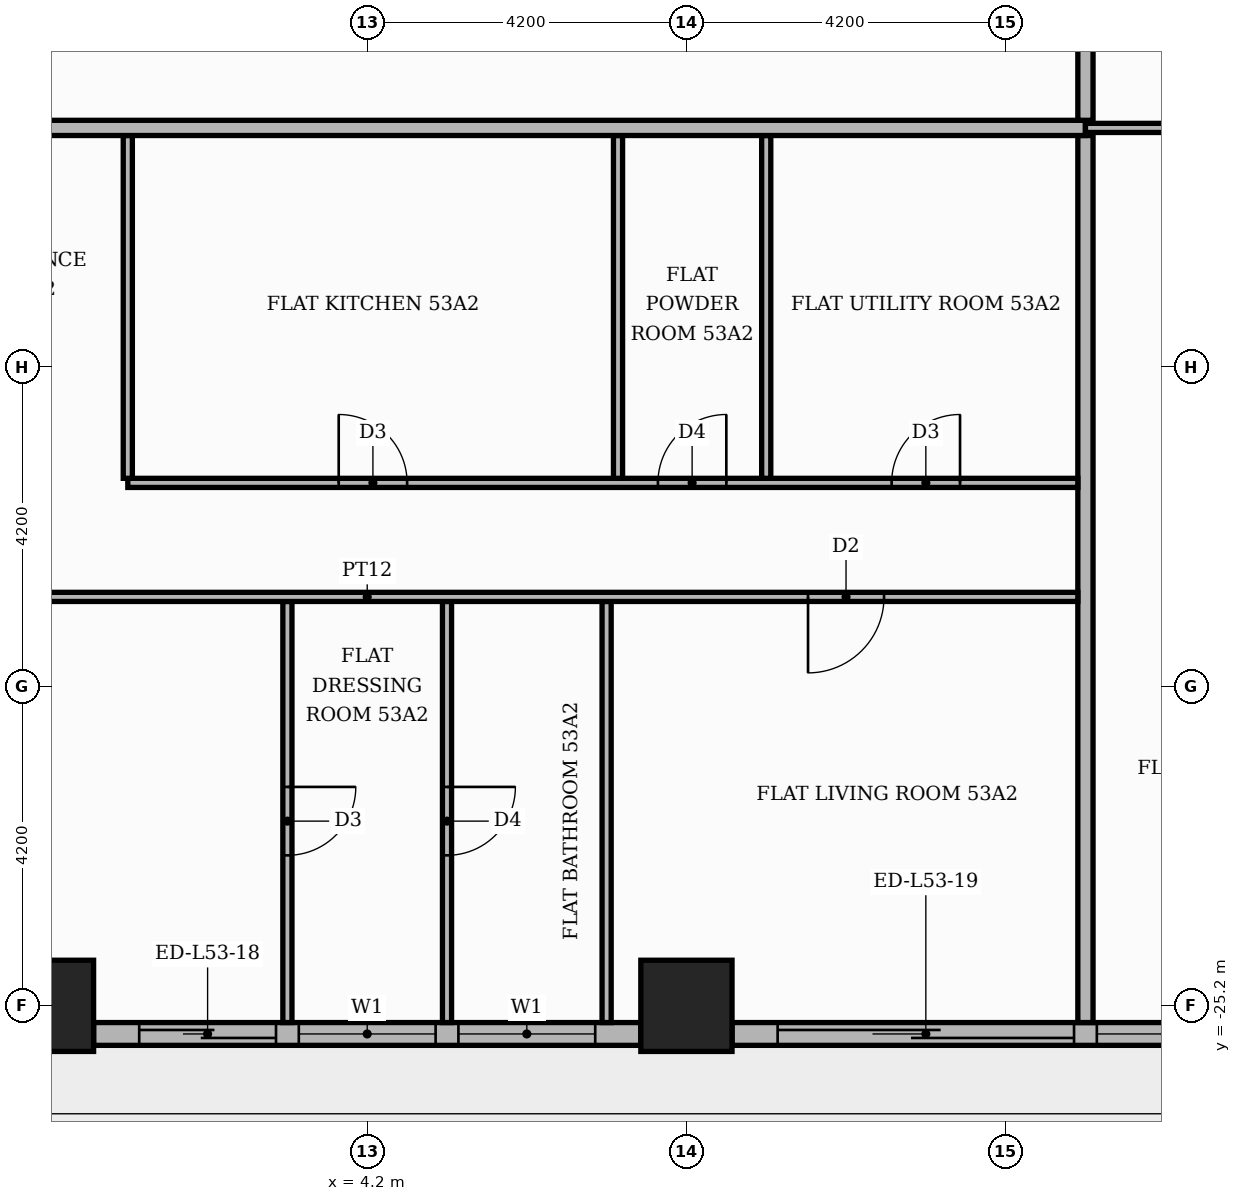
"""IFC4 building model, lengths in metres.
Left out: names, types, materials, properties, quantities, classifications, styles, units other than length and angle.
Written with IfcOpenShell. Run it as: python <this file> out.ifc"""

import sys

from ifc_helpers import new_model, si_unit, direction, frame, frame_2d, origin, origin_2d, place, context, subcontext, project, spatial, rectangle, extrude, element, fill, save


model = new_model("IFC4")
c1 = context("Model", 3, precision=1e-05, world=origin(), true_north=direction((0.0, 1.0)))
c2 = subcontext(c1, "Body", "Model", "MODEL_VIEW")
j1 = project(units=[si_unit("LENGTHUNIT", "METRE"), si_unit("PLANEANGLEUNIT", "RADIAN")], contexts=[c1])
p1 = place(None, origin())
s1 = spatial("IfcSite", under=j1, at=p1, CompositionType="ELEMENT")
p2 = place(p1, origin())
s2 = spatial("IfcBuilding", under=s1, at=p2, CompositionType="ELEMENT")
p3 = place(p2, frame((0.0, 0.0, 223.5)))
s3 = spatial("IfcBuildingStorey", under=s2, at=p3, CompositionType="ELEMENT", Elevation=223.5)
for number, where, z_axis, x_axis in (
    (1, (0.0, -25.2, 0.0), (0.0, 0.0, 1.0), (1.0, 0.0, 0.0)),
    (2, (8.4, -25.2, 0.0), (0.0, 0.0, 1.0), (1.0, 0.0, 0.0)),
):
    element("IfcColumn", number, at=place(p3, frame(where, z_axis=z_axis, x_axis=x_axis)), inside=s3, PredefinedType="COLUMN", context=c2, shape_type="SweptSolid", body=[
        extrude(rectangle(XDim=1.2, YDim=1.2, at=origin_2d()), origin(), (0.0, 0.0, 1.0), 3.9),
    ])
p4 = place(p3, frame((0.6, -25.57, 0.0), z_axis=(0.0, 0.0, 1.0), x_axis=(1.0, 0.0, 0.0)))
e3 = element("IfcWall", 3, at=p4, inside=s3, PredefinedType="STANDARD", context=c2, shape_type="SweptSolid", body=[
    extrude(rectangle(XDim=7.2, YDim=0.3, at=frame_2d((3.6, 0.0))), origin(), (0.0, 0.0, 1.0), 3.48),
])
p5 = place(p4, frame((0.6, 0.0, 0.0)))
e4 = element("IfcOpeningElement", 4, at=p5, cuts=e3, PredefinedType="OPENING", context=c2, shape_type="SweptSolid", body=[
    extrude(rectangle(XDim=1.8, YDim=2.4, at=frame_2d((0.9, 1.2))), frame((0.0, 0.16, 0.0), z_axis=(0.0, -1.0, 0.0), x_axis=(1.0, 0.0, 0.0)), (0.0, 0.0, 1.0), 0.32),
])
p6 = place(p4, frame((2.7, 0.0, 0.9)))
e5 = element("IfcOpeningElement", 5, at=p6, cuts=e3, PredefinedType="OPENING", context=c2, shape_type="SweptSolid", body=[
    extrude(rectangle(XDim=1.8, YDim=2.1, at=frame_2d((0.9, 1.05))), frame((0.0, 0.16, 0.0), z_axis=(0.0, -1.0, 0.0), x_axis=(1.0, 0.0, 0.0)), (0.0, 0.0, 1.0), 0.32),
])
p7 = place(p4, frame((4.8, 0.0, 0.9)))
e6 = element("IfcOpeningElement", 6, at=p7, cuts=e3, PredefinedType="OPENING", context=c2, shape_type="SweptSolid", body=[
    extrude(rectangle(XDim=1.8, YDim=2.1, at=frame_2d((0.9, 1.05))), frame((0.0, 0.16, 0.0), z_axis=(0.0, -1.0, 0.0), x_axis=(1.0, 0.0, 0.0)), (0.0, 0.0, 1.0), 0.32),
])
p8 = place(p3, frame((9.0, -25.57, 0.0), z_axis=(0.0, 0.0, 1.0), x_axis=(1.0, 0.0, 0.0)))
e7 = element("IfcWall", 7, at=p8, inside=s3, PredefinedType="STANDARD", context=c2, shape_type="SweptSolid", body=[
    extrude(rectangle(XDim=7.2, YDim=0.3, at=frame_2d((3.6, 0.0))), origin(), (0.0, 0.0, 1.0), 3.48),
])
p9 = place(p8, frame((0.6, 0.0, 0.0)))
e8 = element("IfcOpeningElement", 8, at=p9, cuts=e7, PredefinedType="OPENING", context=c2, shape_type="SweptSolid", body=[
    extrude(rectangle(XDim=3.9, YDim=2.4, at=frame_2d((1.95, 1.2))), frame((0.0, 0.16, 0.0), z_axis=(0.0, -1.0, 0.0), x_axis=(1.0, 0.0, 0.0)), (0.0, 0.0, 1.0), 0.32),
])
p10 = place(p8, frame((4.8, 0.0, 0.9)))
e9 = element("IfcOpeningElement", 9, at=p10, cuts=e7, PredefinedType="OPENING", context=c2, shape_type="SweptSolid", body=[
    extrude(rectangle(XDim=1.8, YDim=2.1, at=frame_2d((0.9, 1.05))), frame((0.0, 0.16, 0.0), z_axis=(0.0, -1.0, 0.0), x_axis=(1.0, 0.0, 0.0)), (0.0, 0.0, 1.0), 0.32),
])
p11 = place(p3, frame((3.15, -25.42, 0.0), z_axis=(0.0, 0.0, 1.0), x_axis=(0.0, 1.0, 0.0)))
e10 = element("IfcWall", 10, at=p11, inside=s3, PredefinedType="PARTITIONING", context=c2, shape_type="SweptSolid", body=[
    extrude(rectangle(XDim=5.54, YDim=0.12, at=frame_2d((2.77, 0.0))), origin(), (0.0, 0.0, 1.0), 3.48),
])
p12 = place(p11, frame((2.2, 0.0, 0.0)))
e11 = element("IfcOpeningElement", 11, at=p12, cuts=e10, PredefinedType="OPENING", context=c2, shape_type="SweptSolid", body=[
    extrude(rectangle(XDim=0.9, YDim=2.1, at=frame_2d((0.45, 1.05))), frame((0.0, 0.07, 0.0), z_axis=(0.0, -1.0, 0.0), x_axis=(1.0, 0.0, 0.0)), (0.0, 0.0, 1.0), 0.14),
])
p13 = place(p3, frame((5.25, -25.42, 0.0), z_axis=(0.0, 0.0, 1.0), x_axis=(0.0, 1.0, 0.0)))
e12 = element("IfcWall", 12, at=p13, inside=s3, PredefinedType="PARTITIONING", context=c2, shape_type="SweptSolid", body=[
    extrude(rectangle(XDim=5.54, YDim=0.12, at=frame_2d((2.77, 0.0))), origin(), (0.0, 0.0, 1.0), 3.48),
])
p14 = place(p13, frame((2.2, 0.0, 0.0)))
e13 = element("IfcOpeningElement", 13, at=p14, cuts=e12, PredefinedType="OPENING", context=c2, shape_type="SweptSolid", body=[
    extrude(rectangle(XDim=0.9, YDim=2.1, at=frame_2d((0.45, 1.05))), frame((0.0, 0.07, 0.0), z_axis=(0.0, -1.0, 0.0), x_axis=(1.0, 0.0, 0.0)), (0.0, 0.0, 1.0), 0.14),
])
p15 = place(p3, frame((7.35, -25.42, 0.0), z_axis=(0.0, 0.0, 1.0), x_axis=(0.0, 1.0, 0.0)))
e14 = element("IfcWall", 14, at=p15, inside=s3, PredefinedType="PARTITIONING", context=c2, shape_type="SweptSolid", body=[
    extrude(rectangle(XDim=5.54, YDim=0.12, at=frame_2d((2.77, 0.0))), origin(), (0.0, 0.0, 1.0), 3.48),
])
p16 = place(p3, frame((13.65, -25.42, 0.0), z_axis=(0.0, 0.0, 1.0), x_axis=(0.0, 1.0, 0.0)))
e15 = element("IfcWall", 15, at=p16, inside=s3, PredefinedType="PARTITIONING", context=c2, shape_type="SweptSolid", body=[
    extrude(rectangle(XDim=11.67, YDim=0.2, at=frame_2d((5.835, 0.0))), origin(), (0.0, 0.0, 1.0), 3.48),
])
p17 = place(p3, frame((-5.15, -19.82, 0.0), z_axis=(0.0, 0.0, 1.0), x_axis=(1.0, 0.0, 0.0)))
e16 = element("IfcWall", 16, at=p17, inside=s3, PredefinedType="PARTITIONING", context=c2, shape_type="SweptSolid", body=[
    extrude(rectangle(XDim=18.7, YDim=0.12, at=frame_2d((9.35, 0.0))), origin(), (0.0, 0.0, 1.0), 3.48),
])
p18 = place(p17, frame((3.65, 0.0, 0.0)))
e17 = element("IfcOpeningElement", 17, at=p18, cuts=e16, PredefinedType="OPENING", context=c2, shape_type="SweptSolid", body=[
    extrude(rectangle(XDim=0.9, YDim=2.1, at=frame_2d((0.45, 1.05))), frame((0.0, 0.07, 0.0), z_axis=(0.0, -1.0, 0.0), x_axis=(1.0, 0.0, 0.0)), (0.0, 0.0, 1.0), 0.14),
])
p19 = place(p17, frame((15.15, 0.0, 0.0)))
e18 = element("IfcOpeningElement", 18, at=p19, cuts=e16, PredefinedType="OPENING", context=c2, shape_type="SweptSolid", body=[
    extrude(rectangle(XDim=1.0, YDim=2.1, at=frame_2d((0.5, 1.05))), frame((0.0, 0.07, 0.0), z_axis=(0.0, -1.0, 0.0), x_axis=(1.0, 0.0, 0.0)), (0.0, 0.0, 1.0), 0.14),
])
p20 = place(p3, frame((1.05, -18.32, 0.0), z_axis=(0.0, 0.0, 1.0), x_axis=(1.0, 0.0, 0.0)))
e19 = element("IfcWall", 19, at=p20, inside=s3, PredefinedType="PARTITIONING", context=c2, shape_type="SweptSolid", body=[
    extrude(rectangle(XDim=12.5, YDim=0.12, at=frame_2d((6.25, 0.0))), origin(), (0.0, 0.0, 1.0), 3.48),
])
p21 = place(p20, frame((2.775, 0.0, 0.0)))
e20 = element("IfcOpeningElement", 20, at=p21, cuts=e19, PredefinedType="OPENING", context=c2, shape_type="SweptSolid", body=[
    extrude(rectangle(XDim=0.9, YDim=2.1, at=frame_2d((0.45, 1.05))), frame((0.0, 0.07, 0.0), z_axis=(0.0, -1.0, 0.0), x_axis=(1.0, 0.0, 0.0)), (0.0, 0.0, 1.0), 0.14),
])
p22 = place(p20, frame((6.975, 0.0, 0.0)))
e21 = element("IfcOpeningElement", 21, at=p22, cuts=e19, PredefinedType="OPENING", context=c2, shape_type="SweptSolid", body=[
    extrude(rectangle(XDim=0.9, YDim=2.1, at=frame_2d((0.45, 1.05))), frame((0.0, 0.07, 0.0), z_axis=(0.0, -1.0, 0.0), x_axis=(1.0, 0.0, 0.0)), (0.0, 0.0, 1.0), 0.14),
])
p23 = place(p20, frame((10.05, 0.0, 0.0)))
e22 = element("IfcOpeningElement", 22, at=p23, cuts=e19, PredefinedType="OPENING", context=c2, shape_type="SweptSolid", body=[
    extrude(rectangle(XDim=0.9, YDim=2.1, at=frame_2d((0.45, 1.05))), frame((0.0, 0.07, 0.0), z_axis=(0.0, -1.0, 0.0), x_axis=(1.0, 0.0, 0.0)), (0.0, 0.0, 1.0), 0.14),
])
for number, where, z_axis, x_axis in (
    (23, (1.05, -18.26, 0.0), (0.0, 0.0, 1.0), (0.0, 1.0, 0.0)),
    (24, (7.5, -18.26, 0.0), (0.0, 0.0, 1.0), (0.0, 1.0, 0.0)),
    (25, (9.45, -18.26, 0.0), (0.0, 0.0, 1.0), (0.0, 1.0, 0.0)),
):
    element("IfcWall", number, at=place(p3, frame(where, z_axis=z_axis, x_axis=x_axis)), inside=s3, PredefinedType="PARTITIONING", context=c2, shape_type="SweptSolid", body=[
        extrude(rectangle(XDim=4.51, YDim=0.12, at=frame_2d((2.255, 0.0))), origin(), (0.0, 0.0, 1.0), 3.48),
    ])
p24 = place(p3, frame((-25.42, -13.65, 0.0), z_axis=(0.0, 0.0, 1.0), x_axis=(1.0, 0.0, 0.0)))
e26 = element("IfcWall", 26, at=p24, inside=s3, PredefinedType="PARTITIONING", context=c2, shape_type="SweptSolid", body=[
    extrude(rectangle(XDim=39.07, YDim=0.2, at=frame_2d((19.535, 0.0))), origin(), (0.0, 0.0, 1.0), 3.48),
])
p25 = place(p24, frame((13.32, 0.0, 0.0)))
e27 = element("IfcOpeningElement", 27, at=p25, cuts=e26, PredefinedType="OPENING", context=c2, shape_type="SweptSolid", body=[
    extrude(rectangle(XDim=1.1, YDim=2.4, at=frame_2d((0.55, 1.2))), frame((0.0, 0.11, 0.0), z_axis=(0.0, -1.0, 0.0), x_axis=(1.0, 0.0, 0.0)), (0.0, 0.0, 1.0), 0.22),
])
p26 = place(p24, frame((23.82, 0.0, 0.0)))
e28 = element("IfcOpeningElement", 28, at=p26, cuts=e26, PredefinedType="OPENING", context=c2, shape_type="SweptSolid", body=[
    extrude(rectangle(XDim=1.1, YDim=2.4, at=frame_2d((0.55, 1.2))), frame((0.0, 0.11, 0.0), z_axis=(0.0, -1.0, 0.0), x_axis=(1.0, 0.0, 0.0)), (0.0, 0.0, 1.0), 0.22),
])
p27 = place(p3, frame((13.65, -13.65, 0.0), z_axis=(0.0, 0.0, 1.0), x_axis=(1.0, 0.0, 0.0)))
e29 = element("IfcWall", 29, at=p27, inside=s3, PredefinedType="PARTITIONING", context=c2, shape_type="SweptSolid", body=[
    extrude(rectangle(XDim=6.77, YDim=0.12, at=frame_2d((3.385, 0.0))), origin(), (0.0, 0.0, 1.0), 3.48),
])
p28 = place(p27, frame((2.935, 0.0, 0.0)))
e30 = element("IfcOpeningElement", 30, at=p28, cuts=e29, PredefinedType="OPENING", context=c2, shape_type="SweptSolid", body=[
    extrude(rectangle(XDim=0.9, YDim=2.1, at=frame_2d((0.45, 1.05))), frame((0.0, 0.07, 0.0), z_axis=(0.0, -1.0, 0.0), x_axis=(1.0, 0.0, 0.0)), (0.0, 0.0, 1.0), 0.14),
])
p29 = place(p3, frame((13.65, -13.55, 0.0), z_axis=(0.0, 0.0, 1.0), x_axis=(0.0, 1.0, 0.0)))
e31 = element("IfcWall", 31, at=p29, inside=s3, PredefinedType="PARTITIONING", context=c2, shape_type="SweptSolid", body=[
    extrude(rectangle(XDim=2.45, YDim=0.2, at=frame_2d((1.225, 0.0))), origin(), (0.0, 0.0, 1.0), 3.48),
])
p30 = place(p5, origin())
e32 = element("IfcDoor", 32, at=p30, inside=s3, OperationType="SLIDING_TO_LEFT", PredefinedType="DOOR", context=c2, shape_type="SweptSolid", body=[
    extrude(rectangle(XDim=1.8, YDim=2.4, at=frame_2d((0.9, 1.2))), frame((0.0, 0.025, 0.0), z_axis=(0.0, -1.0, 0.0), x_axis=(1.0, 0.0, 0.0)), (0.0, 0.0, 1.0), 0.05),
])
fill(e4, e32)
p31 = place(p6, origin())
e33 = element("IfcWindow", 33, at=p31, inside=s3, PartitioningType="SINGLE_PANEL", PredefinedType="WINDOW", context=c2, shape_type="SweptSolid", body=[
    extrude(rectangle(XDim=1.8, YDim=2.1, at=frame_2d((0.9, 1.05))), frame((0.0, 0.03, 0.0), z_axis=(0.0, -1.0, 0.0), x_axis=(1.0, 0.0, 0.0)), (0.0, 0.0, 1.0), 0.06),
])
fill(e5, e33)
p32 = place(p7, origin())
e34 = element("IfcWindow", 34, at=p32, inside=s3, PartitioningType="SINGLE_PANEL", PredefinedType="WINDOW", context=c2, shape_type="SweptSolid", body=[
    extrude(rectangle(XDim=1.8, YDim=2.1, at=frame_2d((0.9, 1.05))), frame((0.0, 0.03, 0.0), z_axis=(0.0, -1.0, 0.0), x_axis=(1.0, 0.0, 0.0)), (0.0, 0.0, 1.0), 0.06),
])
fill(e6, e34)
p33 = place(p9, origin())
e35 = element("IfcDoor", 35, at=p33, inside=s3, OperationType="SLIDING_TO_LEFT", PredefinedType="DOOR", context=c2, shape_type="SweptSolid", body=[
    extrude(rectangle(XDim=3.9, YDim=2.4, at=frame_2d((1.95, 1.2))), frame((0.0, 0.025, 0.0), z_axis=(0.0, -1.0, 0.0), x_axis=(1.0, 0.0, 0.0)), (0.0, 0.0, 1.0), 0.05),
])
fill(e8, e35)
p34 = place(p10, origin())
e36 = element("IfcWindow", 36, at=p34, inside=s3, PartitioningType="SINGLE_PANEL", PredefinedType="WINDOW", context=c2, shape_type="SweptSolid", body=[
    extrude(rectangle(XDim=1.8, YDim=2.1, at=frame_2d((0.9, 1.05))), frame((0.0, 0.03, 0.0), z_axis=(0.0, -1.0, 0.0), x_axis=(1.0, 0.0, 0.0)), (0.0, 0.0, 1.0), 0.06),
])
fill(e9, e36)
p35 = place(p21, origin())
e37 = element("IfcDoor", 37, at=p35, inside=s3, OperationType="SINGLE_SWING_LEFT", PredefinedType="DOOR", context=c2, shape_type="SweptSolid", body=[
    extrude(rectangle(XDim=0.9, YDim=2.1, at=frame_2d((0.45, 1.05))), frame((0.0, 0.025, 0.0), z_axis=(0.0, -1.0, 0.0), x_axis=(1.0, 0.0, 0.0)), (0.0, 0.0, 1.0), 0.05),
])
fill(e20, e37)
p36 = place(p22, origin())
e38 = element("IfcDoor", 38, at=p36, inside=s3, OperationType="SINGLE_SWING_RIGHT", PredefinedType="DOOR", context=c2, shape_type="SweptSolid", body=[
    extrude(rectangle(XDim=0.9, YDim=2.1, at=frame_2d((0.45, 1.05))), frame((0.0, 0.025, 0.0), z_axis=(0.0, -1.0, 0.0), x_axis=(1.0, 0.0, 0.0)), (0.0, 0.0, 1.0), 0.05),
])
fill(e21, e38)
p37 = place(p23, origin())
e39 = element("IfcDoor", 39, at=p37, inside=s3, OperationType="SINGLE_SWING_RIGHT", PredefinedType="DOOR", context=c2, shape_type="SweptSolid", body=[
    extrude(rectangle(XDim=0.9, YDim=2.1, at=frame_2d((0.45, 1.05))), frame((0.0, 0.025, 0.0), z_axis=(0.0, -1.0, 0.0), x_axis=(1.0, 0.0, 0.0)), (0.0, 0.0, 1.0), 0.05),
])
fill(e22, e39)
p38 = place(p12, frame((0.9, 0.0, 0.0), z_axis=(0.0, 0.0, 1.0), x_axis=(-1.0, 0.0, 0.0)))
e40 = element("IfcDoor", 40, at=p38, inside=s3, OperationType="SINGLE_SWING_RIGHT", PredefinedType="DOOR", context=c2, shape_type="SweptSolid", body=[
    extrude(rectangle(XDim=0.9, YDim=2.1, at=frame_2d((0.45, 1.05))), frame((0.0, 0.025, 0.0), z_axis=(0.0, -1.0, 0.0), x_axis=(1.0, 0.0, 0.0)), (0.0, 0.0, 1.0), 0.05),
])
fill(e11, e40)
p39 = place(p14, frame((0.9, 0.0, 0.0), z_axis=(0.0, 0.0, 1.0), x_axis=(-1.0, 0.0, 0.0)))
e41 = element("IfcDoor", 41, at=p39, inside=s3, OperationType="SINGLE_SWING_RIGHT", PredefinedType="DOOR", context=c2, shape_type="SweptSolid", body=[
    extrude(rectangle(XDim=0.9, YDim=2.1, at=frame_2d((0.45, 1.05))), frame((0.0, 0.025, 0.0), z_axis=(0.0, -1.0, 0.0), x_axis=(1.0, 0.0, 0.0)), (0.0, 0.0, 1.0), 0.05),
])
fill(e13, e41)
p40 = place(p19, frame((1.0, 0.0, 0.0), z_axis=(0.0, 0.0, 1.0), x_axis=(-1.0, 0.0, 0.0)))
e42 = element("IfcDoor", 42, at=p40, inside=s3, OperationType="SINGLE_SWING_LEFT", PredefinedType="DOOR", context=c2, shape_type="SweptSolid", body=[
    extrude(rectangle(XDim=1.0, YDim=2.1, at=frame_2d((0.5, 1.05))), frame((0.0, 0.025, 0.0), z_axis=(0.0, -1.0, 0.0), x_axis=(1.0, 0.0, 0.0)), (0.0, 0.0, 1.0), 0.05),
])
fill(e18, e42)
save(model, sys.argv[1])
